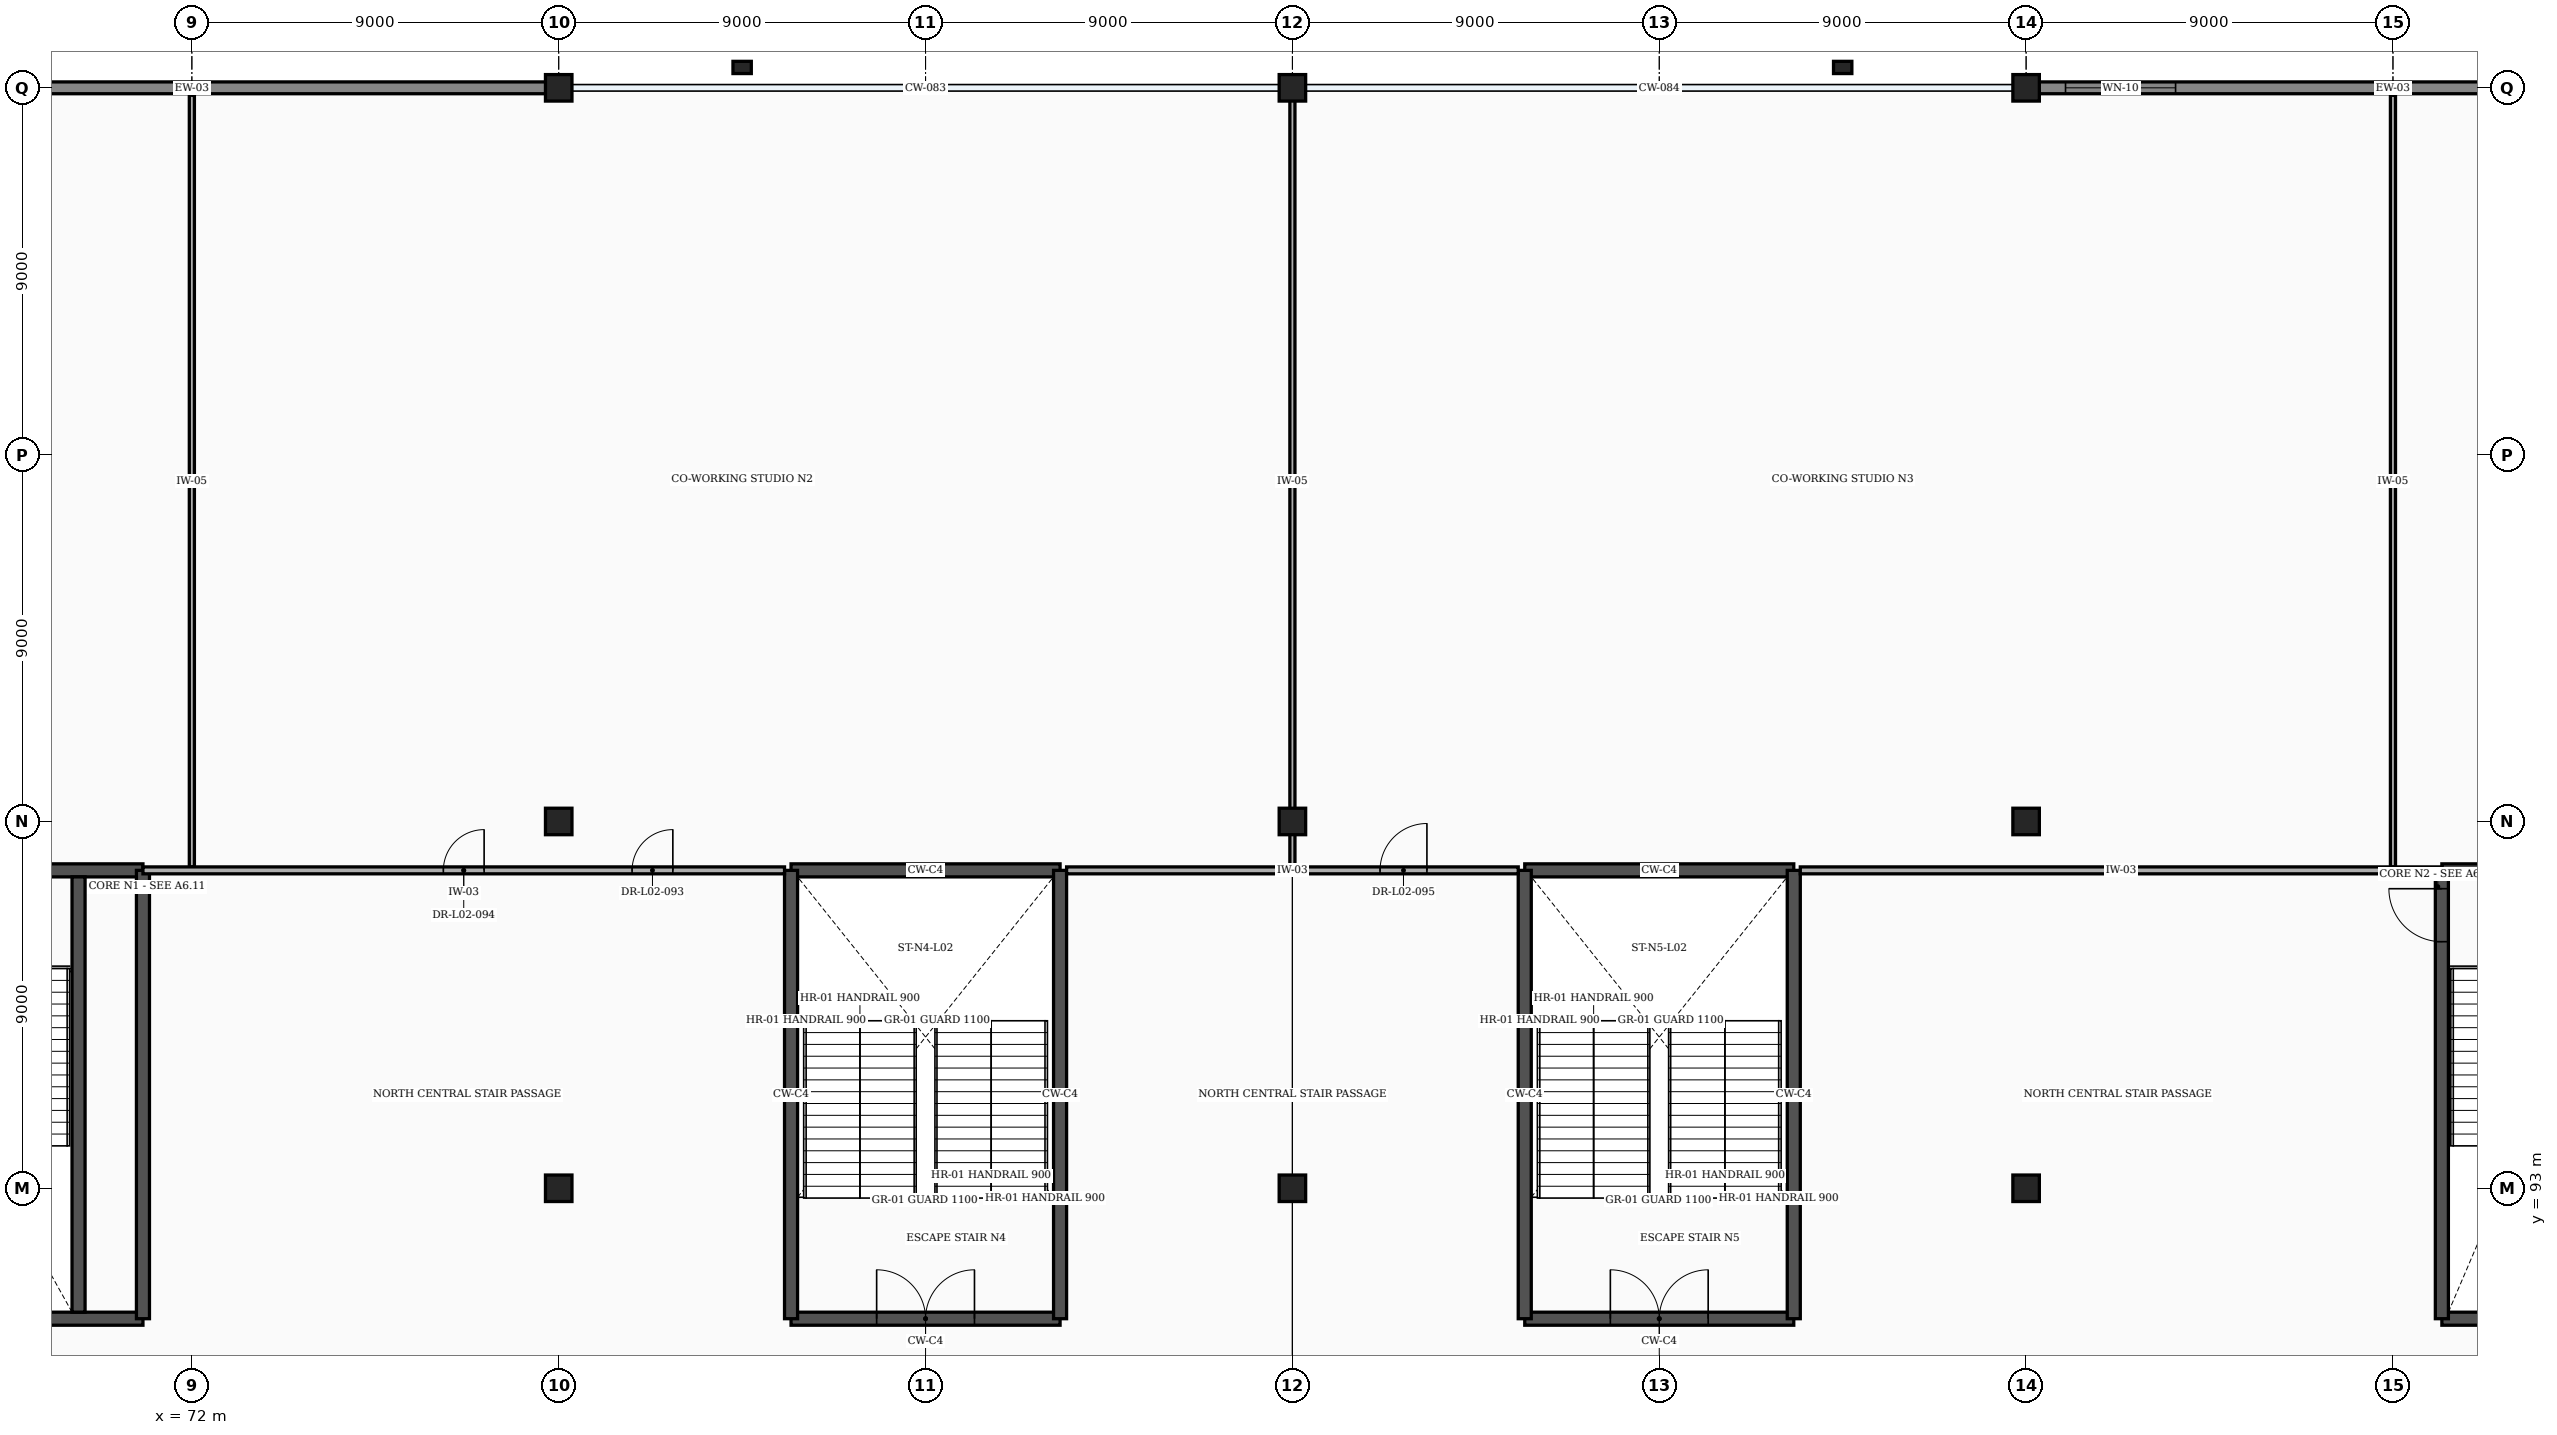
"""IFC4 building model, lengths in metres.
Left out: names, types, materials, properties, quantities, classifications, styles, units other than length and angle.
Written with IfcOpenShell. Run it as: python <this file> out.ifc"""

import sys

from ifc_helpers import new_model, si_unit, direction, frame, frame_2d, origin, origin_2d, place, context, subcontext, project, spatial, rectangle, extrude, element, fill, save


model = new_model("IFC4")
c1 = context("Model", 3, precision=1e-05, world=origin(), true_north=direction((0.0, 1.0)))
c2 = subcontext(c1, "Body", "Model", "MODEL_VIEW")
j1 = project(units=[si_unit("LENGTHUNIT", "METRE"), si_unit("PLANEANGLEUNIT", "RADIAN")], contexts=[c1])
p1 = place(None, origin())
s1 = spatial("IfcSite", under=j1, at=p1, CompositionType="ELEMENT")
p2 = place(p1, origin())
s2 = spatial("IfcBuilding", under=s1, at=p2, CompositionType="ELEMENT")
p3 = place(p2, frame((0.0, 0.0, 11.4)))
s3 = spatial("IfcBuildingStorey", under=s2, at=p3, CompositionType="ELEMENT", Elevation=11.4)
for number, where, z_axis, x_axis in (
    (1, (81.0, 93.0, 0.0), (0.0, 0.0, 1.0), (1.0, 0.0, 0.0)),
    (2, (81.0, 102.0, 0.0), (0.0, 0.0, 1.0), (1.0, 0.0, 0.0)),
    (3, (81.0, 120.0, 0.0), (0.0, 0.0, 1.0), (1.0, 0.0, 0.0)),
    (4, (99.0, 93.0, 0.0), (0.0, 0.0, 1.0), (1.0, 0.0, 0.0)),
    (5, (99.0, 102.0, 0.0), (0.0, 0.0, 1.0), (1.0, 0.0, 0.0)),
    (6, (99.0, 120.0, 0.0), (0.0, 0.0, 1.0), (1.0, 0.0, 0.0)),
    (7, (117.0, 93.0, 0.0), (0.0, 0.0, 1.0), (1.0, 0.0, 0.0)),
    (8, (117.0, 102.0, 0.0), (0.0, 0.0, 1.0), (1.0, 0.0, 0.0)),
    (9, (117.0, 120.0, 0.0), (0.0, 0.0, 1.0), (1.0, 0.0, 0.0)),
):
    element("IfcColumn", number, at=place(p3, frame(where, z_axis=z_axis, x_axis=x_axis)), inside=s3, PredefinedType="COLUMN", context=c2, shape_type="SweptSolid", body=[
        extrude(rectangle(XDim=0.65, YDim=0.65, at=origin_2d()), origin(), (0.0, 0.0, 1.0), 5.4),
    ])
for number, where, z_axis, x_axis in (
    (10, (85.5, 120.5, 0.0), (0.0, 0.0, 1.0), (1.0, 0.0, 0.0)),
    (11, (112.5, 120.5, 0.0), (0.0, 0.0, 1.0), (1.0, 0.0, 0.0)),
):
    element("IfcColumn", number, at=place(p3, frame(where, z_axis=z_axis, x_axis=x_axis)), inside=s3, PredefinedType="PILASTER", context=c2, shape_type="SweptSolid", body=[
        extrude(rectangle(XDim=0.45, YDim=0.3, at=origin_2d()), origin(), (0.0, 0.0, 1.0), 5.4),
    ])
p4 = place(p3, frame((63.317, 120.0, 0.0), z_axis=(0.0, 0.0, 1.0), x_axis=(1.0, 0.0, 0.0)))
e12 = element("IfcWall", 12, at=p4, inside=s3, PredefinedType="STANDARD", context=c2, shape_type="SweptSolid", body=[
    extrude(rectangle(XDim=17.366, YDim=0.29, at=frame_2d((8.683, 0.0))), origin(), (0.0, 0.0, 1.0), 4.38),
])
p5 = place(p4, frame((0.65, 0.0, 0.85)))
e13 = element("IfcOpeningElement", 13, at=p5, cuts=e12, PredefinedType="OPENING", context=c2, shape_type="SweptSolid", body=[
    extrude(rectangle(XDim=2.7, YDim=2.4, at=frame_2d((1.35, 1.2))), frame((0.0, 0.157, 0.0), z_axis=(0.0, -1.0, 0.0), x_axis=(1.0, 0.0, 0.0)), (0.0, 0.0, 1.0), 0.314),
])
p6 = place(p3, frame((117.317, 120.0, 0.0), z_axis=(0.0, 0.0, 1.0), x_axis=(1.0, 0.0, 0.0)))
e14 = element("IfcWall", 14, at=p6, inside=s3, PredefinedType="STANDARD", context=c2, shape_type="SweptSolid", body=[
    extrude(rectangle(XDim=17.366, YDim=0.29, at=frame_2d((8.683, 0.0))), origin(), (0.0, 0.0, 1.0), 4.38),
])
p7 = place(p6, frame((0.65, 0.0, 0.85)))
e15 = element("IfcOpeningElement", 15, at=p7, cuts=e14, PredefinedType="OPENING", context=c2, shape_type="SweptSolid", body=[
    extrude(rectangle(XDim=2.7, YDim=2.4, at=frame_2d((1.35, 1.2))), frame((0.0, 0.157, 0.0), z_axis=(0.0, -1.0, 0.0), x_axis=(1.0, 0.0, 0.0)), (0.0, 0.0, 1.0), 0.314),
])
for number, where, z_axis, x_axis in (
    (16, (64.2, 89.8, 0.0), (0.0, 0.0, 1.0), (1.0, 0.0, 0.0)),
    (17, (64.2, 100.8, 0.0), (0.0, 0.0, 1.0), (1.0, 0.0, 0.0)),
):
    element("IfcWall", number, at=place(p3, frame(where, z_axis=z_axis, x_axis=x_axis)), inside=s3, PredefinedType="SHEAR", context=c2, shape_type="SweptSolid", body=[
        extrude(rectangle(XDim=6.6, YDim=0.32, at=frame_2d((3.3, 0.0))), origin(), (0.0, 0.0, 1.0), 5.15),
    ])
p8 = place(p3, frame((70.8, 89.8, 0.0), z_axis=(0.0, 0.0, 1.0), x_axis=(0.0, 1.0, 0.0)))
e18 = element("IfcWall", 18, at=p8, inside=s3, PredefinedType="SHEAR", context=c2, shape_type="SweptSolid", body=[
    extrude(rectangle(XDim=11.0, YDim=0.32, at=frame_2d((5.5, 0.0))), origin(), (0.0, 0.0, 1.0), 5.15),
])
p9 = place(p3, frame((69.22, 89.96, 0.0), z_axis=(0.0, 0.0, 1.0), x_axis=(0.0, 1.0, 0.0)))
e19 = element("IfcWall", 19, at=p9, inside=s3, PredefinedType="SHEAR", context=c2, shape_type="SweptSolid", body=[
    extrude(rectangle(XDim=10.68, YDim=0.32, at=frame_2d((5.34, 0.0))), origin(), (0.0, 0.0, 1.0), 5.15),
])
p10 = place(p3, frame((127.2, 89.8, 0.0), z_axis=(0.0, 0.0, 1.0), x_axis=(1.0, 0.0, 0.0)))
e20 = element("IfcWall", 20, at=p10, inside=s3, PredefinedType="SHEAR", context=c2, shape_type="SweptSolid", body=[
    extrude(rectangle(XDim=6.6, YDim=0.32, at=frame_2d((3.3, 0.0))), origin(), (0.0, 0.0, 1.0), 5.15),
])
p11 = place(p10, frame((4.45, 0.0, 0.0)))
e21 = element("IfcOpeningElement", 21, at=p11, cuts=e20, PredefinedType="OPENING", context=c2, shape_type="SweptSolid", body=[
    extrude(rectangle(XDim=1.6, YDim=2.3, at=frame_2d((0.8, 1.15))), frame((0.0, 0.172, 0.0), z_axis=(0.0, -1.0, 0.0), x_axis=(1.0, 0.0, 0.0)), (0.0, 0.0, 1.0), 0.344),
])
p12 = place(p3, frame((127.2, 100.8, 0.0), z_axis=(0.0, 0.0, 1.0), x_axis=(1.0, 0.0, 0.0)))
e22 = element("IfcWall", 22, at=p12, inside=s3, PredefinedType="SHEAR", context=c2, shape_type="SweptSolid", body=[
    extrude(rectangle(XDim=6.6, YDim=0.32, at=frame_2d((3.3, 0.0))), origin(), (0.0, 0.0, 1.0), 5.15),
])
p13 = place(p3, frame((127.2, 89.8, 0.0), z_axis=(0.0, 0.0, 1.0), x_axis=(0.0, 1.0, 0.0)))
e23 = element("IfcWall", 23, at=p13, inside=s3, PredefinedType="SHEAR", context=c2, shape_type="SweptSolid", body=[
    extrude(rectangle(XDim=11.0, YDim=0.32, at=frame_2d((5.5, 0.0))), origin(), (0.0, 0.0, 1.0), 5.15),
])
p14 = place(p13, frame((9.25, 0.0, 0.0)))
e24 = element("IfcOpeningElement", 24, at=p14, cuts=e23, PredefinedType="OPENING", context=c2, shape_type="SweptSolid", body=[
    extrude(rectangle(XDim=1.3, YDim=2.2, at=frame_2d((0.65, 1.1))), frame((0.0, 0.172, 0.0), z_axis=(0.0, -1.0, 0.0), x_axis=(1.0, 0.0, 0.0)), (0.0, 0.0, 1.0), 0.344),
])
p15 = place(p3, frame((86.7, 89.8, 0.0), z_axis=(0.0, 0.0, 1.0), x_axis=(1.0, 0.0, 0.0)))
e25 = element("IfcWall", 25, at=p15, inside=s3, PredefinedType="SHEAR", context=c2, shape_type="SweptSolid", body=[
    extrude(rectangle(XDim=6.6, YDim=0.32, at=frame_2d((3.3, 0.0))), origin(), (0.0, 0.0, 1.0), 5.15),
])
p16 = place(p15, frame((2.1, 0.0, 0.0)))
e26 = element("IfcOpeningElement", 26, at=p16, cuts=e25, PredefinedType="OPENING", context=c2, shape_type="SweptSolid", body=[
    extrude(rectangle(XDim=2.4, YDim=2.25, at=frame_2d((1.2, 1.125))), frame((0.0, 0.172, 0.0), z_axis=(0.0, -1.0, 0.0), x_axis=(1.0, 0.0, 0.0)), (0.0, 0.0, 1.0), 0.344),
])
p17 = place(p3, frame((86.7, 100.8, 0.0), z_axis=(0.0, 0.0, 1.0), x_axis=(1.0, 0.0, 0.0)))
e27 = element("IfcWall", 27, at=p17, inside=s3, PredefinedType="SHEAR", context=c2, shape_type="SweptSolid", body=[
    extrude(rectangle(XDim=6.6, YDim=0.32, at=frame_2d((3.3, 0.0))), origin(), (0.0, 0.0, 1.0), 5.15),
])
for number, where, z_axis, x_axis in (
    (28, (86.7, 89.8, 0.0), (0.0, 0.0, 1.0), (0.0, 1.0, 0.0)),
    (29, (93.3, 89.8, 0.0), (0.0, 0.0, 1.0), (0.0, 1.0, 0.0)),
):
    element("IfcWall", number, at=place(p3, frame(where, z_axis=z_axis, x_axis=x_axis)), inside=s3, PredefinedType="SHEAR", context=c2, shape_type="SweptSolid", body=[
        extrude(rectangle(XDim=11.0, YDim=0.32, at=frame_2d((5.5, 0.0))), origin(), (0.0, 0.0, 1.0), 5.15),
    ])
p18 = place(p3, frame((104.7, 89.8, 0.0), z_axis=(0.0, 0.0, 1.0), x_axis=(1.0, 0.0, 0.0)))
e30 = element("IfcWall", 30, at=p18, inside=s3, PredefinedType="SHEAR", context=c2, shape_type="SweptSolid", body=[
    extrude(rectangle(XDim=6.6, YDim=0.32, at=frame_2d((3.3, 0.0))), origin(), (0.0, 0.0, 1.0), 5.15),
])
p19 = place(p18, frame((2.1, 0.0, 0.0)))
e31 = element("IfcOpeningElement", 31, at=p19, cuts=e30, PredefinedType="OPENING", context=c2, shape_type="SweptSolid", body=[
    extrude(rectangle(XDim=2.4, YDim=2.25, at=frame_2d((1.2, 1.125))), frame((0.0, 0.172, 0.0), z_axis=(0.0, -1.0, 0.0), x_axis=(1.0, 0.0, 0.0)), (0.0, 0.0, 1.0), 0.344),
])
p20 = place(p3, frame((104.7, 100.8, 0.0), z_axis=(0.0, 0.0, 1.0), x_axis=(1.0, 0.0, 0.0)))
e32 = element("IfcWall", 32, at=p20, inside=s3, PredefinedType="SHEAR", context=c2, shape_type="SweptSolid", body=[
    extrude(rectangle(XDim=6.6, YDim=0.32, at=frame_2d((3.3, 0.0))), origin(), (0.0, 0.0, 1.0), 5.15),
])
for number, where, z_axis, x_axis in (
    (33, (104.7, 89.8, 0.0), (0.0, 0.0, 1.0), (0.0, 1.0, 0.0)),
    (34, (111.3, 89.8, 0.0), (0.0, 0.0, 1.0), (0.0, 1.0, 0.0)),
):
    element("IfcWall", number, at=place(p3, frame(where, z_axis=z_axis, x_axis=x_axis)), inside=s3, PredefinedType="SHEAR", context=c2, shape_type="SweptSolid", body=[
        extrude(rectangle(XDim=11.0, YDim=0.32, at=frame_2d((5.5, 0.0))), origin(), (0.0, 0.0, 1.0), 5.15),
    ])
p21 = place(p3, frame((72.0, 100.885, 0.0), z_axis=(0.0, 0.0, 1.0), x_axis=(0.0, 1.0, 0.0)))
e35 = element("IfcWall", 35, at=p21, inside=s3, PredefinedType="PARTITIONING", context=c2, shape_type="SweptSolid", body=[
    extrude(rectangle(XDim=18.932, YDim=0.125, at=frame_2d((9.466, 0.0))), origin(), (0.0, 0.0, 1.0), 5.15),
])
p22 = place(p3, frame((99.0, 100.885, 0.0), z_axis=(0.0, 0.0, 1.0), x_axis=(0.0, 1.0, 0.0)))
e36 = element("IfcWall", 36, at=p22, inside=s3, PredefinedType="PARTITIONING", context=c2, shape_type="SweptSolid", body=[
    extrude(rectangle(XDim=18.932, YDim=0.125, at=frame_2d((9.466, 0.0))), origin(), (0.0, 0.0, 1.0), 4.53),
])
p23 = place(p3, frame((126.0, 100.885, 0.0), z_axis=(0.0, 0.0, 1.0), x_axis=(0.0, 1.0, 0.0)))
e37 = element("IfcWall", 37, at=p23, inside=s3, PredefinedType="PARTITIONING", context=c2, shape_type="SweptSolid", body=[
    extrude(rectangle(XDim=18.932, YDim=0.125, at=frame_2d((9.466, 0.0))), origin(), (0.0, 0.0, 1.0), 5.15),
])
p24 = place(p3, frame((70.8, 100.8, 0.0), z_axis=(0.0, 0.0, 1.0), x_axis=(1.0, 0.0, 0.0)))
e38 = element("IfcWall", 38, at=p24, inside=s3, PredefinedType="PARTITIONING", context=c2, shape_type="SweptSolid", body=[
    extrude(rectangle(XDim=15.74, YDim=0.17, at=frame_2d((7.87, 0.0))), origin(), (0.0, 0.0, 1.0), 5.15),
])
p25 = place(p24, frame((12.0, 0.0, 0.0)))
e39 = element("IfcOpeningElement", 39, at=p25, cuts=e38, PredefinedType="OPENING", context=c2, shape_type="SweptSolid", body=[
    extrude(rectangle(XDim=1.0, YDim=2.15, at=frame_2d((0.5, 1.075))), frame((0.0, 0.097, 0.0), z_axis=(0.0, -1.0, 0.0), x_axis=(1.0, 0.0, 0.0)), (0.0, 0.0, 1.0), 0.194),
])
p26 = place(p24, frame((7.37, 0.0, 0.0)))
e40 = element("IfcOpeningElement", 40, at=p26, cuts=e38, PredefinedType="OPENING", context=c2, shape_type="SweptSolid", body=[
    extrude(rectangle(XDim=1.0, YDim=2.15, at=frame_2d((0.5, 1.075))), frame((0.0, 0.097, 0.0), z_axis=(0.0, -1.0, 0.0), x_axis=(1.0, 0.0, 0.0)), (0.0, 0.0, 1.0), 0.194),
])
p27 = place(p3, frame((93.46, 100.8, 0.0), z_axis=(0.0, 0.0, 1.0), x_axis=(1.0, 0.0, 0.0)))
e41 = element("IfcWall", 41, at=p27, inside=s3, PredefinedType="PARTITIONING", context=c2, shape_type="SweptSolid", body=[
    extrude(rectangle(XDim=11.08, YDim=0.17, at=frame_2d((5.54, 0.0))), origin(), (0.0, 0.0, 1.0), 5.15),
])
p28 = place(p27, frame((7.69, 0.0, 0.0)))
e42 = element("IfcOpeningElement", 42, at=p28, cuts=e41, PredefinedType="OPENING", context=c2, shape_type="SweptSolid", body=[
    extrude(rectangle(XDim=1.15, YDim=2.15, at=frame_2d((0.575, 1.075))), frame((0.0, 0.097, 0.0), z_axis=(0.0, -1.0, 0.0), x_axis=(1.0, 0.0, 0.0)), (0.0, 0.0, 1.0), 0.194),
])
p29 = place(p3, frame((111.46, 100.8, 0.0), z_axis=(0.0, 0.0, 1.0), x_axis=(1.0, 0.0, 0.0)))
e43 = element("IfcWall", 43, at=p29, inside=s3, PredefinedType="PARTITIONING", context=c2, shape_type="SweptSolid", body=[
    extrude(rectangle(XDim=15.74, YDim=0.17, at=frame_2d((7.87, 0.0))), origin(), (0.0, 0.0, 1.0), 5.15),
])
p30 = place(p7, origin())
e44 = element("IfcWindow", 44, at=p30, inside=s3, PartitioningType="SINGLE_PANEL", PredefinedType="WINDOW", context=c2, shape_type="SweptSolid", body=[
    extrude(rectangle(XDim=2.7, YDim=2.4, at=frame_2d((1.35, 1.2))), frame((0.0, 0.03, 0.0), z_axis=(0.0, -1.0, 0.0), x_axis=(1.0, 0.0, 0.0)), (0.0, 0.0, 1.0), 0.06),
])
fill(e15, e44)
p31 = place(p14, origin())
e45 = element("IfcDoor", 45, at=p31, inside=s3, OperationType="SINGLE_SWING_RIGHT", PredefinedType="DOOR", context=c2, shape_type="SweptSolid", body=[
    extrude(rectangle(XDim=1.3, YDim=2.2, at=frame_2d((0.65, 1.1))), frame((0.0, 0.025, 0.0), z_axis=(0.0, -1.0, 0.0), x_axis=(1.0, 0.0, 0.0)), (0.0, 0.0, 1.0), 0.05),
])
fill(e24, e45)
p32 = place(p16, origin())
e46 = element("IfcDoor", 46, at=p32, inside=s3, OperationType="DOUBLE_DOOR_SINGLE_SWING", PredefinedType="DOOR", context=c2, shape_type="SweptSolid", body=[
    extrude(rectangle(XDim=2.4, YDim=2.25, at=frame_2d((1.2, 1.125))), frame((0.0, 0.025, 0.0), z_axis=(0.0, -1.0, 0.0), x_axis=(1.0, 0.0, 0.0)), (0.0, 0.0, 1.0), 0.05),
])
fill(e26, e46)
p33 = place(p19, origin())
e47 = element("IfcDoor", 47, at=p33, inside=s3, OperationType="DOUBLE_DOOR_SINGLE_SWING", PredefinedType="DOOR", context=c2, shape_type="SweptSolid", body=[
    extrude(rectangle(XDim=2.4, YDim=2.25, at=frame_2d((1.2, 1.125))), frame((0.0, 0.025, 0.0), z_axis=(0.0, -1.0, 0.0), x_axis=(1.0, 0.0, 0.0)), (0.0, 0.0, 1.0), 0.05),
])
fill(e31, e47)
p34 = place(p25, origin())
e48 = element("IfcDoor", 48, at=p34, inside=s3, OperationType="SINGLE_SWING_RIGHT", PredefinedType="DOOR", context=c2, shape_type="SweptSolid", body=[
    extrude(rectangle(XDim=1.0, YDim=2.15, at=frame_2d((0.5, 1.075))), frame((0.0, 0.025, 0.0), z_axis=(0.0, -1.0, 0.0), x_axis=(1.0, 0.0, 0.0)), (0.0, 0.0, 1.0), 0.05),
])
fill(e39, e48)
p35 = place(p26, origin())
e49 = element("IfcDoor", 49, at=p35, inside=s3, OperationType="SINGLE_SWING_RIGHT", PredefinedType="DOOR", context=c2, shape_type="SweptSolid", body=[
    extrude(rectangle(XDim=1.0, YDim=2.15, at=frame_2d((0.5, 1.075))), frame((0.0, 0.025, 0.0), z_axis=(0.0, -1.0, 0.0), x_axis=(1.0, 0.0, 0.0)), (0.0, 0.0, 1.0), 0.05),
])
fill(e40, e49)
p36 = place(p28, origin())
e50 = element("IfcDoor", 50, at=p36, inside=s3, OperationType="SINGLE_SWING_RIGHT", PredefinedType="DOOR", context=c2, shape_type="SweptSolid", body=[
    extrude(rectangle(XDim=1.15, YDim=2.15, at=frame_2d((0.575, 1.075))), frame((0.0, 0.025, 0.0), z_axis=(0.0, -1.0, 0.0), x_axis=(1.0, 0.0, 0.0)), (0.0, 0.0, 1.0), 0.05),
])
fill(e42, e50)
save(model, sys.argv[1])
